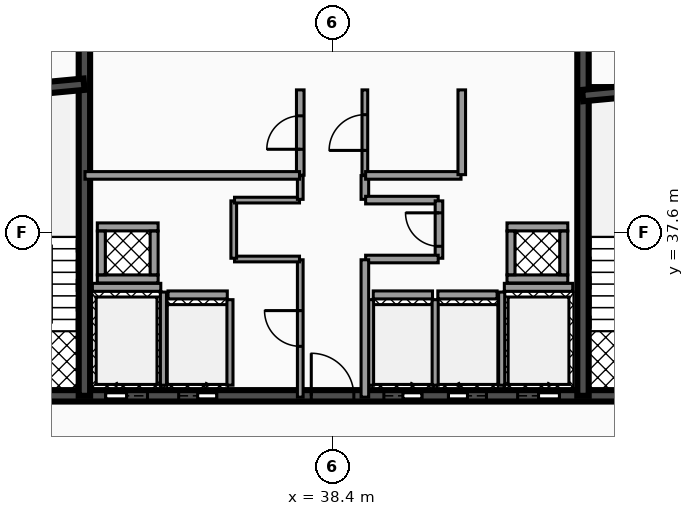
"""IFC4 building model, lengths in metres.
Left out: names, types, materials, properties, quantities, classifications, styles, units other than length and angle.
Written with IfcOpenShell. Run it as: python <this file> out.ifc"""

import sys

from ifc_helpers import new_model, si_unit, direction, frame, frame_2d, origin, place, context, subcontext, project, spatial, rectangle, extrude, element, fill, save


model = new_model("IFC4")
c1 = context("Model", 3, precision=1e-05, world=origin(), true_north=direction((0.0, 1.0)))
c2 = subcontext(c1, "Body", "Model", "MODEL_VIEW")
j1 = project(units=[si_unit("LENGTHUNIT", "METRE"), si_unit("PLANEANGLEUNIT", "RADIAN")], contexts=[c1])
p1 = place(None, origin())
s1 = spatial("IfcSite", under=j1, at=p1, CompositionType="ELEMENT")
p2 = place(p1, origin())
s2 = spatial("IfcBuilding", under=s1, at=p2, CompositionType="ELEMENT")
p3 = place(p2, frame((0.0, 0.0, 292.4)))
s3 = spatial("IfcBuildingStorey", under=s2, at=p3, CompositionType="ELEMENT", Elevation=292.4)
p4 = place(p3, frame((28.5, 33.3, 0.0), z_axis=(0.0, 0.0, 1.0), x_axis=(1.0, 0.0, 0.0)))
e1 = element("IfcWall", 1, at=p4, inside=s3, PredefinedType="SHEAR", context=c2, shape_type="SweptSolid", body=[
    extrude(rectangle(XDim=19.86, YDim=0.3, at=frame_2d((9.93, 0.0))), origin(), (0.0, 0.0, 1.0), 3.18),
])
p5 = place(p4, frame((3.93, 0.0, 0.0)))
e2 = element("IfcOpeningElement", 2, at=p5, cuts=e1, PredefinedType="OPENING", context=c2, shape_type="SweptSolid", body=[
    extrude(rectangle(XDim=1.1, YDim=2.15, at=frame_2d((0.55, 1.075))), frame((0.0, 0.16, 0.0), z_axis=(0.0, -1.0, 0.0), x_axis=(1.0, 0.0, 0.0)), (0.0, 0.0, 1.0), 0.32),
])
p6 = place(p4, frame((14.77, 0.0, 0.0)))
e3 = element("IfcOpeningElement", 3, at=p6, cuts=e1, PredefinedType="OPENING", context=c2, shape_type="SweptSolid", body=[
    extrude(rectangle(XDim=1.1, YDim=2.15, at=frame_2d((0.55, 1.075))), frame((0.0, 0.16, 0.0), z_axis=(0.0, -1.0, 0.0), x_axis=(1.0, 0.0, 0.0)), (0.0, 0.0, 1.0), 0.32),
])
p7 = place(p4, frame((11.25, 0.0, 0.0)))
e4 = element("IfcOpeningElement", 4, at=p7, cuts=e1, PredefinedType="OPENING", context=c2, shape_type="SweptSolid", body=[
    extrude(rectangle(XDim=1.0, YDim=2.1, at=frame_2d((0.5, 1.05))), frame((0.0, 0.16, 0.0), z_axis=(0.0, -1.0, 0.0), x_axis=(1.0, 0.0, 0.0)), (0.0, 0.0, 1.0), 0.32),
])
p8 = place(p4, frame((12.95, 0.0, 0.0)))
e5 = element("IfcOpeningElement", 5, at=p8, cuts=e1, PredefinedType="OPENING", context=c2, shape_type="SweptSolid", body=[
    extrude(rectangle(XDim=1.0, YDim=2.1, at=frame_2d((0.5, 1.05))), frame((0.0, 0.16, 0.0), z_axis=(0.0, -1.0, 0.0), x_axis=(1.0, 0.0, 0.0)), (0.0, 0.0, 1.0), 0.32),
])
p9 = place(p4, frame((5.85, 0.0, 0.0)))
e6 = element("IfcOpeningElement", 6, at=p9, cuts=e1, PredefinedType="OPENING", context=c2, shape_type="SweptSolid", body=[
    extrude(rectangle(XDim=1.0, YDim=2.1, at=frame_2d((0.5, 1.05))), frame((0.0, 0.16, 0.0), z_axis=(0.0, -1.0, 0.0), x_axis=(1.0, 0.0, 0.0)), (0.0, 0.0, 1.0), 0.32),
])
p10 = place(p4, frame((1.21, 0.0, 0.0)))
e7 = element("IfcOpeningElement", 7, at=p10, cuts=e1, PredefinedType="OPENING", context=c2, shape_type="SweptSolid", body=[
    extrude(rectangle(XDim=1.1, YDim=2.2, at=frame_2d((0.55, 1.1))), frame((0.0, 0.16, 0.0), z_axis=(0.0, -1.0, 0.0), x_axis=(1.0, 0.0, 0.0)), (0.0, 0.0, 1.0), 0.32),
])
p11 = place(p4, frame((9.34, 0.0, 0.0)))
e8 = element("IfcOpeningElement", 8, at=p11, cuts=e1, PredefinedType="OPENING", context=c2, shape_type="SweptSolid", body=[
    extrude(rectangle(XDim=1.12, YDim=2.05, at=frame_2d((0.56, 1.025))), frame((0.0, 0.16, 0.0), z_axis=(0.0, -1.0, 0.0), x_axis=(1.0, 0.0, 0.0)), (0.0, 0.0, 1.0), 0.32),
])
p12 = place(p4, frame((17.55, 0.0, 0.0)))
e9 = element("IfcOpeningElement", 9, at=p12, cuts=e1, PredefinedType="OPENING", context=c2, shape_type="SweptSolid", body=[
    extrude(rectangle(XDim=1.1, YDim=2.2, at=frame_2d((0.55, 1.1))), frame((0.0, 0.16, 0.0), z_axis=(0.0, -1.0, 0.0), x_axis=(1.0, 0.0, 0.0)), (0.0, 0.0, 1.0), 0.32),
])
for number, where, z_axis, x_axis in (
    (10, (31.87, 33.3, 0.0), (0.0, 0.0, 1.0), (0.0, 1.0, 0.0)),
    (11, (44.99, 33.3, 0.0), (0.0, 0.0, 1.0), (0.0, 1.0, 0.0)),
):
    element("IfcWall", number, at=place(p3, frame(where, z_axis=z_axis, x_axis=x_axis)), inside=s3, PredefinedType="SHEAR", context=c2, shape_type="SweptSolid", body=[
        extrude(rectangle(XDim=10.1, YDim=0.3, at=frame_2d((5.05, 0.0))), origin(), (0.0, 0.0, 1.0), 3.18),
    ])
p13 = place(p3, frame((28.64, 41.2, 0.0), z_axis=(0.0, 0.0, 1.0), x_axis=(0.995687118776, 0.092774789157, 0.0)))
e12 = element("IfcWall", 12, at=p13, inside=s3, PredefinedType="SHEAR", context=c2, shape_type="SweptSolid", body=[
    extrude(rectangle(XDim=3.234, YDim=0.3, at=frame_2d((1.617, 0.0))), origin(), (0.0, 0.0, 1.0), 3.18),
])
p14 = place(p3, frame((44.98, 41.2, 0.0), z_axis=(0.0, 0.0, 1.0), x_axis=(0.995686468965, 0.09278176286, 0.0)))
e13 = element("IfcWall", 13, at=p14, inside=s3, PredefinedType="SHEAR", context=c2, shape_type="SweptSolid", body=[
    extrude(rectangle(XDim=3.234, YDim=0.3, at=frame_2d((1.617, 0.0))), origin(), (0.0, 0.0, 1.0), 3.18),
])
p15 = place(p3, frame((32.08, 36.155, 0.0), z_axis=(0.0, 0.0, 1.0), x_axis=(1.0, 0.0, 0.0)))
e14 = element("IfcWall", 14, at=p15, inside=s3, PredefinedType="SOLIDWALL", context=c2, shape_type="SweptSolid", body=[
    extrude(rectangle(XDim=1.8, YDim=0.21, at=frame_2d((0.9, 0.0))), origin(), (0.0, 0.0, 1.0), 3.18),
])
p16 = place(p3, frame((33.95, 33.58, 0.0), z_axis=(0.0, 0.0, 1.0), x_axis=(0.0, 1.0, 0.0)))
e15 = element("IfcWall", 15, at=p16, inside=s3, PredefinedType="SOLIDWALL", context=c2, shape_type="SweptSolid", body=[
    extrude(rectangle(XDim=2.45, YDim=0.16, at=frame_2d((1.225, 0.0))), origin(), (0.0, 0.0, 1.0), 3.18),
])
p17 = place(p3, frame((42.92, 36.155, 0.0), z_axis=(0.0, 0.0, 1.0), x_axis=(1.0, 0.0, 0.0)))
e16 = element("IfcWall", 16, at=p17, inside=s3, PredefinedType="SOLIDWALL", context=c2, shape_type="SweptSolid", body=[
    extrude(rectangle(XDim=1.8, YDim=0.21, at=frame_2d((0.9, 0.0))), origin(), (0.0, 0.0, 1.0), 3.18),
])
p18 = place(p3, frame((42.85, 33.58, 0.0), z_axis=(0.0, 0.0, 1.0), x_axis=(0.0, 1.0, 0.0)))
e17 = element("IfcWall", 17, at=p18, inside=s3, PredefinedType="SOLIDWALL", context=c2, shape_type="SweptSolid", body=[
    extrude(rectangle(XDim=2.45, YDim=0.16, at=frame_2d((1.225, 0.0))), origin(), (0.0, 0.0, 1.0), 3.18),
])
p19 = place(p3, frame((39.47, 35.955, 0.0), z_axis=(0.0, 0.0, 1.0), x_axis=(1.0, 0.0, 0.0)))
e18 = element("IfcWall", 18, at=p19, inside=s3, PredefinedType="SOLIDWALL", context=c2, shape_type="SweptSolid", body=[
    extrude(rectangle(XDim=1.56, YDim=0.21, at=frame_2d((0.78, 0.0))), origin(), (0.0, 0.0, 1.0), 3.18),
])
for number, where, z_axis, x_axis in (
    (19, (39.4, 33.58, 0.0), (0.0, 0.0, 1.0), (0.0, 1.0, 0.0)),
    (20, (41.1, 33.58, 0.0), (0.0, 0.0, 1.0), (0.0, 1.0, 0.0)),
):
    element("IfcWall", number, at=place(p3, frame(where, z_axis=z_axis, x_axis=x_axis)), inside=s3, PredefinedType="SOLIDWALL", context=c2, shape_type="SweptSolid", body=[
        extrude(rectangle(XDim=2.25, YDim=0.16, at=frame_2d((1.125, 0.0))), origin(), (0.0, 0.0, 1.0), 3.18),
    ])
p20 = place(p3, frame((41.17, 35.955, 0.0), z_axis=(0.0, 0.0, 1.0), x_axis=(1.0, 0.0, 0.0)))
e21 = element("IfcWall", 21, at=p20, inside=s3, PredefinedType="SOLIDWALL", context=c2, shape_type="SweptSolid", body=[
    extrude(rectangle(XDim=1.56, YDim=0.21, at=frame_2d((0.78, 0.0))), origin(), (0.0, 0.0, 1.0), 3.18),
])
p21 = place(p3, frame((34.07, 35.955, 0.0), z_axis=(0.0, 0.0, 1.0), x_axis=(1.0, 0.0, 0.0)))
e22 = element("IfcWall", 22, at=p21, inside=s3, PredefinedType="SOLIDWALL", context=c2, shape_type="SweptSolid", body=[
    extrude(rectangle(XDim=1.56, YDim=0.21, at=frame_2d((0.78, 0.0))), origin(), (0.0, 0.0, 1.0), 3.18),
])
p22 = place(p3, frame((35.7, 33.58, 0.0), z_axis=(0.0, 0.0, 1.0), x_axis=(0.0, 1.0, 0.0)))
e23 = element("IfcWall", 23, at=p22, inside=s3, PredefinedType="SOLIDWALL", context=c2, shape_type="SweptSolid", body=[
    extrude(rectangle(XDim=2.25, YDim=0.16, at=frame_2d((1.125, 0.0))), origin(), (0.0, 0.0, 1.0), 3.18),
])
for number, where, z_axis, x_axis in (
    (24, (32.21, 36.375, 0.0), (0.0, 0.0, 1.0), (1.0, 0.0, 0.0)),
    (25, (32.21, 37.745, 0.0), (0.0, 0.0, 1.0), (1.0, 0.0, 0.0)),
):
    element("IfcWall", number, at=place(p3, frame(where, z_axis=z_axis, x_axis=x_axis)), inside=s3, PredefinedType="SOLIDWALL", context=c2, shape_type="SweptSolid", body=[
        extrude(rectangle(XDim=1.6, YDim=0.21, at=frame_2d((0.8, 0.0))), origin(), (0.0, 0.0, 1.0), 3.18),
    ])
for number, where, z_axis, x_axis in (
    (26, (32.315, 36.485, 0.0), (0.0, 0.0, 1.0), (0.0, 1.0, 0.0)),
    (27, (33.705, 36.485, 0.0), (0.0, 0.0, 1.0), (0.0, 1.0, 0.0)),
):
    element("IfcWall", number, at=place(p3, frame(where, z_axis=z_axis, x_axis=x_axis)), inside=s3, PredefinedType="SOLIDWALL", context=c2, shape_type="SweptSolid", body=[
        extrude(rectangle(XDim=1.15, YDim=0.21, at=frame_2d((0.575, 0.0))), origin(), (0.0, 0.0, 1.0), 3.18),
    ])
for number, where, z_axis, x_axis in (
    (28, (42.99, 36.375, 0.0), (0.0, 0.0, 1.0), (1.0, 0.0, 0.0)),
    (29, (42.99, 37.745, 0.0), (0.0, 0.0, 1.0), (1.0, 0.0, 0.0)),
):
    element("IfcWall", number, at=place(p3, frame(where, z_axis=z_axis, x_axis=x_axis)), inside=s3, PredefinedType="SOLIDWALL", context=c2, shape_type="SweptSolid", body=[
        extrude(rectangle(XDim=1.6, YDim=0.21, at=frame_2d((0.8, 0.0))), origin(), (0.0, 0.0, 1.0), 3.18),
    ])
for number, where, z_axis, x_axis in (
    (30, (43.095, 36.485, 0.0), (0.0, 0.0, 1.0), (0.0, 1.0, 0.0)),
    (31, (44.485, 36.485, 0.0), (0.0, 0.0, 1.0), (0.0, 1.0, 0.0)),
):
    element("IfcWall", number, at=place(p3, frame(where, z_axis=z_axis, x_axis=x_axis)), inside=s3, PredefinedType="SOLIDWALL", context=c2, shape_type="SweptSolid", body=[
        extrude(rectangle(XDim=1.15, YDim=0.21, at=frame_2d((0.575, 0.0))), origin(), (0.0, 0.0, 1.0), 3.18),
    ])
p23 = place(p3, frame((37.55, 33.265, 0.0), z_axis=(0.0, 0.0, 1.0), x_axis=(0.0, 1.0, 0.0)))
e32 = element("IfcWall", 32, at=p23, inside=s3, PredefinedType="PARTITIONING", context=c2, shape_type="SweptSolid", body=[
    extrude(rectangle(XDim=3.615, YDim=0.15, at=frame_2d((1.808, 0.0))), origin(), (0.0, 0.0, 1.0), 2.235),
])
p24 = place(p23, frame((1.337, 0.0, 0.0)))
e33 = element("IfcOpeningElement", 33, at=p24, cuts=e32, PredefinedType="OPENING", context=c2, shape_type="SweptSolid", body=[
    extrude(rectangle(XDim=0.94, YDim=2.05, at=frame_2d((0.47, 1.025))), frame((0.0, 0.085, 0.0), z_axis=(0.0, -1.0, 0.0), x_axis=(1.0, 0.0, 0.0)), (0.0, 0.0, 1.0), 0.17),
])
p25 = place(p3, frame((35.82, 36.9, 0.0), z_axis=(0.0, 0.0, 1.0), x_axis=(1.0, 0.0, 0.0)))
e34 = element("IfcWall", 34, at=p25, inside=s3, PredefinedType="PARTITIONING", context=c2, shape_type="SweptSolid", body=[
    extrude(rectangle(XDim=1.71, YDim=0.15, at=frame_2d((0.855, 0.0))), origin(), (0.0, 0.0, 1.0), 2.235),
])
p26 = place(p3, frame((35.8, 36.92, 0.0), z_axis=(0.0, 0.0, 1.0), x_axis=(0.0, 1.0, 0.0)))
e35 = element("IfcWall", 35, at=p26, inside=s3, PredefinedType="PARTITIONING", context=c2, shape_type="SweptSolid", body=[
    extrude(rectangle(XDim=1.51, YDim=0.15, at=frame_2d((0.755, 0.0))), origin(), (0.0, 0.0, 1.0), 2.235),
])
p27 = place(p3, frame((35.82, 38.45, 0.0), z_axis=(0.0, 0.0, 1.0), x_axis=(1.0, 0.0, 0.0)))
e36 = element("IfcWall", 36, at=p27, inside=s3, PredefinedType="PARTITIONING", context=c2, shape_type="SweptSolid", body=[
    extrude(rectangle(XDim=1.71, YDim=0.15, at=frame_2d((0.855, 0.0))), origin(), (0.0, 0.0, 1.0), 2.235),
])
p28 = place(p3, frame((37.55, 38.47, 0.0), z_axis=(0.0, 0.0, 1.0), x_axis=(0.0, 1.0, 0.0)))
e37 = element("IfcWall", 37, at=p28, inside=s3, PredefinedType="PARTITIONING", context=c2, shape_type="SweptSolid", body=[
    extrude(rectangle(XDim=0.625, YDim=0.15, at=frame_2d((0.312, 0.0))), origin(), (0.0, 0.0, 1.0), 2.235),
])
p29 = place(p3, frame((37.55, 39.105, 0.0), z_axis=(0.0, 0.0, 1.0), x_axis=(0.0, 1.0, 0.0)))
e38 = element("IfcWall", 38, at=p29, inside=s3, PredefinedType="PARTITIONING", context=c2, shape_type="SweptSolid", body=[
    extrude(rectangle(XDim=2.245, YDim=0.2, at=frame_2d((1.123, 0.0))), origin(), (0.0, 0.0, 1.0), 2.235),
])
p30 = place(p29, frame((0.683, 0.0, 0.0)))
e39 = element("IfcOpeningElement", 39, at=p30, cuts=e38, PredefinedType="OPENING", context=c2, shape_type="SweptSolid", body=[
    extrude(rectangle(XDim=0.88, YDim=2.05, at=frame_2d((0.44, 1.025))), frame((0.0, 0.11, 0.0), z_axis=(0.0, -1.0, 0.0), x_axis=(1.0, 0.0, 0.0)), (0.0, 0.0, 1.0), 0.22),
])
p31 = place(p3, frame((39.25, 38.47, 0.0), z_axis=(0.0, 0.0, 1.0), x_axis=(0.0, 1.0, 0.0)))
e40 = element("IfcWall", 40, at=p31, inside=s3, PredefinedType="PARTITIONING", context=c2, shape_type="SweptSolid", body=[
    extrude(rectangle(XDim=0.625, YDim=0.2, at=frame_2d((0.312, 0.0))), origin(), (0.0, 0.0, 1.0), 2.235),
])
p32 = place(p3, frame((39.27, 38.45, 0.0), z_axis=(0.0, 0.0, 1.0), x_axis=(1.0, 0.0, 0.0)))
e41 = element("IfcWall", 41, at=p32, inside=s3, PredefinedType="PARTITIONING", context=c2, shape_type="SweptSolid", body=[
    extrude(rectangle(XDim=1.91, YDim=0.2, at=frame_2d((0.955, 0.0))), origin(), (0.0, 0.0, 1.0), 2.235),
])
p33 = place(p3, frame((41.2, 36.92, 0.0), z_axis=(0.0, 0.0, 1.0), x_axis=(0.0, 1.0, 0.0)))
e42 = element("IfcWall", 42, at=p33, inside=s3, PredefinedType="PARTITIONING", context=c2, shape_type="SweptSolid", body=[
    extrude(rectangle(XDim=1.51, YDim=0.2, at=frame_2d((0.755, 0.0))), origin(), (0.0, 0.0, 1.0), 2.235),
])
p34 = place(p33, frame((0.315, 0.0, 0.0)))
e43 = element("IfcOpeningElement", 43, at=p34, cuts=e42, PredefinedType="OPENING", context=c2, shape_type="SweptSolid", body=[
    extrude(rectangle(XDim=0.88, YDim=2.05, at=frame_2d((0.44, 1.025))), frame((0.0, 0.11, 0.0), z_axis=(0.0, -1.0, 0.0), x_axis=(1.0, 0.0, 0.0)), (0.0, 0.0, 1.0), 0.22),
])
p35 = place(p3, frame((39.27, 36.9, 0.0), z_axis=(0.0, 0.0, 1.0), x_axis=(1.0, 0.0, 0.0)))
e44 = element("IfcWall", 44, at=p35, inside=s3, PredefinedType="PARTITIONING", context=c2, shape_type="SweptSolid", body=[
    extrude(rectangle(XDim=1.91, YDim=0.2, at=frame_2d((0.955, 0.0))), origin(), (0.0, 0.0, 1.0), 2.235),
])
p36 = place(p3, frame((39.25, 33.265, 0.0), z_axis=(0.0, 0.0, 1.0), x_axis=(0.0, 1.0, 0.0)))
e45 = element("IfcWall", 45, at=p36, inside=s3, PredefinedType="PARTITIONING", context=c2, shape_type="SweptSolid", body=[
    extrude(rectangle(XDim=3.615, YDim=0.2, at=frame_2d((1.808, 0.0))), origin(), (0.0, 0.0, 1.0), 2.235),
])
p37 = place(p3, frame((39.25, 39.105, 0.0), z_axis=(0.0, 0.0, 1.0), x_axis=(0.0, 1.0, 0.0)))
e46 = element("IfcWall", 46, at=p37, inside=s3, PredefinedType="PARTITIONING", context=c2, shape_type="SweptSolid", body=[
    extrude(rectangle(XDim=2.245, YDim=0.15, at=frame_2d((1.123, 0.0))), origin(), (0.0, 0.0, 1.0), 2.235),
])
p38 = place(p37, frame((0.653, 0.0, 0.0)))
e47 = element("IfcOpeningElement", 47, at=p38, cuts=e46, PredefinedType="OPENING", context=c2, shape_type="SweptSolid", body=[
    extrude(rectangle(XDim=0.94, YDim=2.05, at=frame_2d((0.47, 1.025))), frame((0.0, 0.085, 0.0), z_axis=(0.0, -1.0, 0.0), x_axis=(1.0, 0.0, 0.0)), (0.0, 0.0, 1.0), 0.17),
])
p39 = place(p3, frame((31.885, 39.1, 0.0), z_axis=(0.0, 0.0, 1.0), x_axis=(1.0, 0.0, 0.0)))
e48 = element("IfcWall", 48, at=p39, inside=s3, PredefinedType="PARTITIONING", context=c2, shape_type="SweptSolid", body=[
    extrude(rectangle(XDim=5.645, YDim=0.2, at=frame_2d((2.823, 0.0))), origin(), (0.0, 0.0, 1.0), 2.235),
])
p40 = place(p3, frame((39.27, 39.1, 0.0), z_axis=(0.0, 0.0, 1.0), x_axis=(1.0, 0.0, 0.0)))
e49 = element("IfcWall", 49, at=p40, inside=s3, PredefinedType="PARTITIONING", context=c2, shape_type="SweptSolid", body=[
    extrude(rectangle(XDim=2.51, YDim=0.2, at=frame_2d((1.255, 0.0))), origin(), (0.0, 0.0, 1.0), 2.235),
])
p41 = place(p3, frame((41.8, 39.12, 0.0), z_axis=(0.0, 0.0, 1.0), x_axis=(0.0, 1.0, 0.0)))
e50 = element("IfcWall", 50, at=p41, inside=s3, PredefinedType="PARTITIONING", context=c2, shape_type="SweptSolid", body=[
    extrude(rectangle(XDim=2.23, YDim=0.2, at=frame_2d((1.115, 0.0))), origin(), (0.0, 0.0, 1.0), 2.235),
])
p42 = place(p5, origin())
e51 = element("IfcDoor", 51, at=p42, inside=s3, OperationType="SLIDING_TO_LEFT", PredefinedType="DOOR", context=c2, shape_type="SweptSolid", body=[
    extrude(rectangle(XDim=1.1, YDim=2.15, at=frame_2d((0.55, 1.075))), frame((0.0, 0.025, 0.0), z_axis=(0.0, -1.0, 0.0), x_axis=(1.0, 0.0, 0.0)), (0.0, 0.0, 1.0), 0.05),
])
fill(e2, e51)
p43 = place(p6, origin())
e52 = element("IfcDoor", 52, at=p43, inside=s3, OperationType="SLIDING_TO_RIGHT", PredefinedType="DOOR", context=c2, shape_type="SweptSolid", body=[
    extrude(rectangle(XDim=1.1, YDim=2.15, at=frame_2d((0.55, 1.075))), frame((0.0, 0.025, 0.0), z_axis=(0.0, -1.0, 0.0), x_axis=(1.0, 0.0, 0.0)), (0.0, 0.0, 1.0), 0.05),
])
fill(e3, e52)
p44 = place(p7, origin())
e53 = element("IfcDoor", 53, at=p44, inside=s3, OperationType="SLIDING_TO_RIGHT", PredefinedType="DOOR", context=c2, shape_type="SweptSolid", body=[
    extrude(rectangle(XDim=1.0, YDim=2.1, at=frame_2d((0.5, 1.05))), frame((0.0, 0.025, 0.0), z_axis=(0.0, -1.0, 0.0), x_axis=(1.0, 0.0, 0.0)), (0.0, 0.0, 1.0), 0.05),
])
fill(e4, e53)
p45 = place(p8, origin())
e54 = element("IfcDoor", 54, at=p45, inside=s3, OperationType="SLIDING_TO_LEFT", PredefinedType="DOOR", context=c2, shape_type="SweptSolid", body=[
    extrude(rectangle(XDim=1.0, YDim=2.1, at=frame_2d((0.5, 1.05))), frame((0.0, 0.025, 0.0), z_axis=(0.0, -1.0, 0.0), x_axis=(1.0, 0.0, 0.0)), (0.0, 0.0, 1.0), 0.05),
])
fill(e5, e54)
p46 = place(p9, origin())
e55 = element("IfcDoor", 55, at=p46, inside=s3, OperationType="SLIDING_TO_RIGHT", PredefinedType="DOOR", context=c2, shape_type="SweptSolid", body=[
    extrude(rectangle(XDim=1.0, YDim=2.1, at=frame_2d((0.5, 1.05))), frame((0.0, 0.025, 0.0), z_axis=(0.0, -1.0, 0.0), x_axis=(1.0, 0.0, 0.0)), (0.0, 0.0, 1.0), 0.05),
])
fill(e6, e55)
p47 = place(p11, origin())
e56 = element("IfcDoor", 56, at=p47, inside=s3, OperationType="SINGLE_SWING_LEFT", PredefinedType="DOOR", context=c2, shape_type="SweptSolid", body=[
    extrude(rectangle(XDim=1.12, YDim=2.05, at=frame_2d((0.56, 1.025))), frame((0.0, 0.025, 0.0), z_axis=(0.0, -1.0, 0.0), x_axis=(1.0, 0.0, 0.0)), (0.0, 0.0, 1.0), 0.05),
])
fill(e8, e56)
p48 = place(p24, origin())
e57 = element("IfcDoor", 57, at=p48, inside=s3, OperationType="SINGLE_SWING_RIGHT", PredefinedType="DOOR", context=c2, shape_type="SweptSolid", body=[
    extrude(rectangle(XDim=0.94, YDim=2.05, at=frame_2d((0.47, 1.025))), frame((0.0, 0.025, 0.0), z_axis=(0.0, -1.0, 0.0), x_axis=(1.0, 0.0, 0.0)), (0.0, 0.0, 1.0), 0.05),
])
fill(e33, e57)
p49 = place(p30, origin())
e58 = element("IfcDoor", 58, at=p49, inside=s3, OperationType="SINGLE_SWING_LEFT", PredefinedType="DOOR", context=c2, shape_type="SweptSolid", body=[
    extrude(rectangle(XDim=0.88, YDim=2.05, at=frame_2d((0.44, 1.025))), frame((0.0, 0.025, 0.0), z_axis=(0.0, -1.0, 0.0), x_axis=(1.0, 0.0, 0.0)), (0.0, 0.0, 1.0), 0.05),
])
fill(e39, e58)
p50 = place(p34, origin())
e59 = element("IfcDoor", 59, at=p50, inside=s3, OperationType="SINGLE_SWING_RIGHT", PredefinedType="DOOR", context=c2, shape_type="SweptSolid", body=[
    extrude(rectangle(XDim=0.88, YDim=2.05, at=frame_2d((0.44, 1.025))), frame((0.0, 0.025, 0.0), z_axis=(0.0, -1.0, 0.0), x_axis=(1.0, 0.0, 0.0)), (0.0, 0.0, 1.0), 0.05),
])
fill(e43, e59)
p51 = place(p38, origin())
e60 = element("IfcDoor", 60, at=p51, inside=s3, OperationType="SINGLE_SWING_LEFT", PredefinedType="DOOR", context=c2, shape_type="SweptSolid", body=[
    extrude(rectangle(XDim=0.94, YDim=2.05, at=frame_2d((0.47, 1.025))), frame((0.0, 0.025, 0.0), z_axis=(0.0, -1.0, 0.0), x_axis=(1.0, 0.0, 0.0)), (0.0, 0.0, 1.0), 0.05),
])
fill(e47, e60)
save(model, sys.argv[1])
